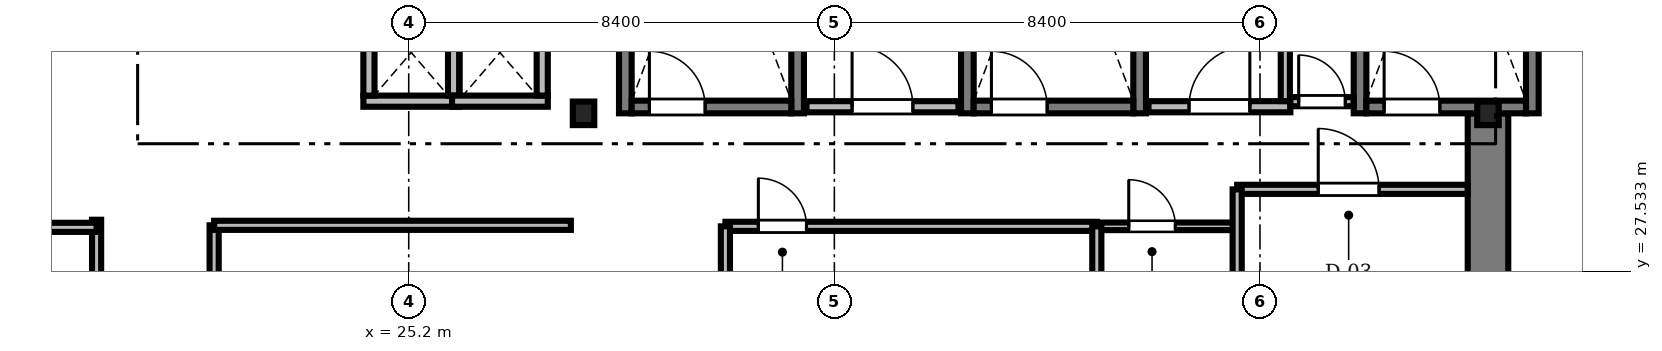
"""IFC4 building model, lengths in metres.
Left out: names, types, materials, properties, quantities, classifications, styles, units other than length and angle.
Written with IfcOpenShell. Run it as: python <this file> out.ifc"""

import sys

from ifc_helpers import new_model, si_unit, direction, frame, frame_2d, origin, origin_2d, place, context, subcontext, project, spatial, rectangle, i_section, extrude, source, transform, mapped, element, fill, save


model = new_model("IFC4")
c1 = context("Model", 3, precision=1e-05, world=origin(), true_north=direction((0.0, 1.0)))
c2 = subcontext(c1, "Body", "Model", "MODEL_VIEW")
j1 = project(units=[si_unit("LENGTHUNIT", "METRE"), si_unit("PLANEANGLEUNIT", "RADIAN")], contexts=[c1])
p1 = place(None, origin())
s1 = spatial("IfcSite", under=j1, at=p1, CompositionType="ELEMENT")
p2 = place(p1, origin())
s2 = spatial("IfcBuilding", under=s1, at=p2, CompositionType="ELEMENT")
p3 = place(p2, frame((0.0, 0.0, 118.7)))
s3 = spatial("IfcBuildingStorey", under=s2, at=p3, CompositionType="ELEMENT", Elevation=118.7)
m1 = source(origin(), c2, "Body", "SweptSolid", [
    extrude(rectangle(XDim=13.15, YDim=0.8, at=frame_2d((6.575, 0.0))), origin(), (0.0, 0.0, 1.0), 3.46),
])
p4 = place(p3, frame((46.5, 17.5, 0.0), z_axis=(0.0, 0.0, 1.0), x_axis=(0.0, 1.0, 0.0)))
e1 = element("IfcWall", 1, at=p4, inside=s3, PredefinedType="SHEAR", context=c2, shape_type="MappedRepresentation", body=[
    mapped(m1, transform((0.0, 0.0, 0.0), scale=1.0)),
])
m2 = source(origin(), c2, "Body", "SweptSolid", [
    extrude(i_section(OverallWidth=0.424, OverallDepth=0.465, WebThickness=0.035, FlangeThickness=0.056, FilletRadius=0.015, at=origin_2d()), origin(), (0.0, 0.0, 1.0), 3.46),
])
for number, where, z_axis, x_axis in (
    (2, (28.65, 30.65, 0.0), (0.0, 0.0, 1.0), (1.0, 0.0, 0.0)),
    (3, (46.5, 30.65, 0.0), (0.0, 0.0, 1.0), (1.0, 0.0, 0.0)),
):
    element("IfcColumn", number, at=place(p3, frame(where, z_axis=z_axis, x_axis=x_axis)), inside=s3, PredefinedType="COLUMN", context=c2, shape_type="MappedRepresentation", body=[
        mapped(m2, transform((0.0, 0.0, 0.0), scale=1.0)),
    ])
m3 = source(origin(), c2, "Body", "SweptSolid", [
    extrude(rectangle(XDim=9.25, YDim=0.25, at=frame_2d((4.625, 0.0))), origin(), (0.0, 0.0, 1.0), 3.5),
])
for number, where, z_axis, x_axis in (
    (4, (29.475, 30.65, 0.0), (0.0, 0.0, 1.0), (0.0, 1.0, 0.0)),
    (5, (32.875, 30.65, 0.0), (0.0, 0.0, 1.0), (0.0, 1.0, 0.0)),
):
    element("IfcWall", number, at=place(p3, frame(where, z_axis=z_axis, x_axis=x_axis)), inside=s3, PredefinedType="SOLIDWALL", context=c2, shape_type="MappedRepresentation", body=[
        mapped(m3, transform((0.0, 0.0, 0.0), scale=1.0)),
    ])
m4 = source(origin(), c2, "Body", "SweptSolid", [
    extrude(rectangle(XDim=3.15, YDim=0.25, at=frame_2d((1.575, 0.0))), origin(), (0.0, 0.0, 1.0), 3.5),
])
p5 = place(p3, frame((29.6, 30.775, 0.0), z_axis=(0.0, 0.0, 1.0), x_axis=(1.0, 0.0, 0.0)))
e6 = element("IfcWall", 6, at=p5, inside=s3, PredefinedType="SOLIDWALL", context=c2, shape_type="MappedRepresentation", body=[
    mapped(m4, transform((0.0, 0.0, 0.0), scale=1.0)),
])
m5 = source(origin(), c2, "Body", "SweptSolid", [
    extrude(rectangle(XDim=1.1, YDim=2.2, at=frame_2d((0.55, 1.1))), frame((0.0, 0.135, 0.0), z_axis=(0.0, -1.0, 0.0), x_axis=(1.0, 0.0, 0.0)), (0.0, 0.0, 1.0), 0.27),
])
p6 = place(p5, frame((0.35, 0.0, 0.0)))
e7 = element("IfcOpeningElement", 7, at=p6, cuts=e6, PredefinedType="OPENING", context=c2, shape_type="MappedRepresentation", body=[
    mapped(m5, transform((0.0, 0.0, 0.0), scale=1.0)),
])
for number, where, z_axis, x_axis in (
    (8, (36.225, 30.65, 0.0), (0.0, 0.0, 1.0), (0.0, 1.0, 0.0)),
    (9, (39.625, 30.65, 0.0), (0.0, 0.0, 1.0), (0.0, 1.0, 0.0)),
):
    element("IfcWall", number, at=place(p3, frame(where, z_axis=z_axis, x_axis=x_axis)), inside=s3, PredefinedType="SOLIDWALL", context=c2, shape_type="MappedRepresentation", body=[
        mapped(m3, transform((0.0, 0.0, 0.0), scale=1.0)),
    ])
p7 = place(p3, frame((36.35, 30.775, 0.0), z_axis=(0.0, 0.0, 1.0), x_axis=(1.0, 0.0, 0.0)))
e10 = element("IfcWall", 10, at=p7, inside=s3, PredefinedType="SOLIDWALL", context=c2, shape_type="MappedRepresentation", body=[
    mapped(m4, transform((0.0, 0.0, 0.0), scale=1.0)),
])
p8 = place(p7, frame((0.35, 0.0, 0.0)))
e11 = element("IfcOpeningElement", 11, at=p8, cuts=e10, PredefinedType="OPENING", context=c2, shape_type="MappedRepresentation", body=[
    mapped(m5, transform((0.0, 0.0, 0.0), scale=1.0)),
])
for number, where, z_axis, x_axis in (
    (12, (43.975, 30.65, 0.0), (0.0, 0.0, 1.0), (0.0, 1.0, 0.0)),
    (13, (47.375, 30.65, 0.0), (0.0, 0.0, 1.0), (0.0, 1.0, 0.0)),
):
    element("IfcWall", number, at=place(p3, frame(where, z_axis=z_axis, x_axis=x_axis)), inside=s3, PredefinedType="SOLIDWALL", context=c2, shape_type="MappedRepresentation", body=[
        mapped(m3, transform((0.0, 0.0, 0.0), scale=1.0)),
    ])
p9 = place(p3, frame((44.1, 30.775, 0.0), z_axis=(0.0, 0.0, 1.0), x_axis=(1.0, 0.0, 0.0)))
e14 = element("IfcWall", 14, at=p9, inside=s3, PredefinedType="SOLIDWALL", context=c2, shape_type="MappedRepresentation", body=[
    mapped(m4, transform((0.0, 0.0, 0.0), scale=1.0)),
])
p10 = place(p9, frame((0.35, 0.0, 0.0)))
e15 = element("IfcOpeningElement", 15, at=p10, cuts=e14, PredefinedType="OPENING", context=c2, shape_type="MappedRepresentation", body=[
    mapped(m5, transform((0.0, 0.0, 0.0), scale=1.0)),
])
m6 = source(origin(), c2, "Body", "SweptSolid", [
    extrude(rectangle(XDim=3.0, YDim=0.22, at=frame_2d((1.5, 0.0))), origin(), (0.0, 0.0, 1.0), 3.46),
])
p11 = place(p3, frame((33.05, 30.78, 0.0), z_axis=(0.0, 0.0, 1.0), x_axis=(1.0, 0.0, 0.0)))
e16 = element("IfcWall", 16, at=p11, inside=s3, PredefinedType="SOLIDWALL", context=c2, shape_type="MappedRepresentation", body=[
    mapped(m6, transform((0.0, 0.0, 0.0), scale=1.0)),
])
m7 = source(origin(), c2, "Body", "SweptSolid", [
    extrude(rectangle(XDim=1.2, YDim=2.2, at=frame_2d((0.6, 1.1))), frame((0.0, 0.12, 0.0), z_axis=(0.0, -1.0, 0.0), x_axis=(1.0, 0.0, 0.0)), (0.0, 0.0, 1.0), 0.24),
])
p12 = place(p11, frame((0.9, 0.0, 0.0)))
e17 = element("IfcOpeningElement", 17, at=p12, cuts=e16, PredefinedType="OPENING", context=c2, shape_type="MappedRepresentation", body=[
    mapped(m7, transform((0.0, 0.0, 0.0), scale=1.0)),
])
m8 = source(origin(), c2, "Body", "SweptSolid", [
    extrude(rectangle(XDim=2.8, YDim=0.22, at=frame_2d((1.4, 0.0))), origin(), (0.0, 0.0, 1.0), 3.46),
])
p13 = place(p3, frame((39.8, 30.78, 0.0), z_axis=(0.0, 0.0, 1.0), x_axis=(1.0, 0.0, 0.0)))
e18 = element("IfcWall", 18, at=p13, inside=s3, PredefinedType="SOLIDWALL", context=c2, shape_type="MappedRepresentation", body=[
    mapped(m8, transform((0.0, 0.0, 0.0), scale=1.0)),
])
p14 = place(p13, frame((0.8, 0.0, 0.0)))
e19 = element("IfcOpeningElement", 19, at=p14, cuts=e18, PredefinedType="OPENING", context=c2, shape_type="MappedRepresentation", body=[
    mapped(m7, transform((0.0, 0.0, 0.0), scale=1.0)),
])
m9 = source(origin(), c2, "Body", "SweptSolid", [
    extrude(rectangle(XDim=1.89, YDim=0.22, at=frame_2d((0.945, 0.0))), origin(), (0.0, 0.0, 1.0), 3.46),
])
p15 = place(p3, frame((24.305, 30.89, 0.0), z_axis=(0.0, 0.0, 1.0), x_axis=(1.0, 0.0, 0.0)))
e20 = element("IfcWall", 20, at=p15, inside=s3, PredefinedType="SOLIDWALL", context=c2, shape_type="MappedRepresentation", body=[
    mapped(m9, transform((0.0, 0.0, 0.0), scale=1.0)),
])
m10 = source(origin(), c2, "Body", "SweptSolid", [
    extrude(rectangle(XDim=1.7, YDim=0.22, at=frame_2d((0.85, 0.0))), origin(), (0.0, 0.0, 1.0), 3.46),
])
for number, where, z_axis, x_axis in (
    (21, (24.415, 31.0, 0.0), (0.0, 0.0, 1.0), (0.0, 1.0, 0.0)),
    (22, (26.085, 31.0, 0.0), (0.0, 0.0, 1.0), (0.0, 1.0, 0.0)),
):
    element("IfcWall", number, at=place(p3, frame(where, z_axis=z_axis, x_axis=x_axis)), inside=s3, PredefinedType="SOLIDWALL", context=c2, shape_type="MappedRepresentation", body=[
        mapped(m10, transform((0.0, 0.0, 0.0), scale=1.0)),
    ])
p16 = place(p3, frame((26.055, 30.89, 0.0), z_axis=(0.0, 0.0, 1.0), x_axis=(1.0, 0.0, 0.0)))
e23 = element("IfcWall", 23, at=p16, inside=s3, PredefinedType="SOLIDWALL", context=c2, shape_type="MappedRepresentation", body=[
    mapped(m9, transform((0.0, 0.0, 0.0), scale=1.0)),
])
p17 = place(p3, frame((27.835, 31.0, 0.0), z_axis=(0.0, 0.0, 1.0), x_axis=(0.0, 1.0, 0.0)))
e24 = element("IfcWall", 24, at=p17, inside=s3, PredefinedType="SOLIDWALL", context=c2, shape_type="MappedRepresentation", body=[
    mapped(m10, transform((0.0, 0.0, 0.0), scale=1.0)),
])
m11 = source(origin(), c2, "Body", "SweptSolid", [
    extrude(rectangle(XDim=14.6, YDim=0.18, at=frame_2d((7.3, 0.0))), origin(), (0.0, 0.0, 1.0), 2.852),
])
p18 = place(p3, frame((19.04, 13.95, 0.0), z_axis=(0.0, 0.0, 1.0), x_axis=(0.0, 1.0, 0.0)))
e25 = element("IfcWall", 25, at=p18, inside=s3, PredefinedType="PARTITIONING", context=c2, shape_type="MappedRepresentation", body=[
    mapped(m11, transform((0.0, 0.0, 0.0), scale=1.0)),
])
m12 = source(origin(), c2, "Body", "SweptSolid", [
    extrude(rectangle(XDim=1.05, YDim=2.2, at=frame_2d((0.525, 1.1))), frame((0.0, 0.1, 0.0), z_axis=(0.0, -1.0, 0.0), x_axis=(1.0, 0.0, 0.0)), (0.0, 0.0, 1.0), 0.2),
])
p19 = place(p18, frame((1.888, 0.0, 0.0)))
e26 = element("IfcOpeningElement", 26, at=p19, cuts=e25, PredefinedType="OPENING", context=c2, shape_type="MappedRepresentation", body=[
    mapped(m12, transform((0.0, 0.0, 0.0), scale=1.0)),
])
m13 = source(origin(), c2, "Body", "SweptSolid", [
    extrude(rectangle(XDim=0.95, YDim=2.15, at=frame_2d((0.475, 1.075))), frame((0.0, 0.1, 0.0), z_axis=(0.0, -1.0, 0.0), x_axis=(1.0, 0.0, 0.0)), (0.0, 0.0, 1.0), 0.2),
])
p20 = place(p18, frame((7.93, 0.0, 0.0)))
e27 = element("IfcOpeningElement", 27, at=p20, cuts=e25, PredefinedType="OPENING", context=c2, shape_type="MappedRepresentation", body=[
    mapped(m13, transform((0.0, 0.0, 0.0), scale=1.0)),
])
p21 = place(p18, frame((11.522, 0.0, 0.0)))
e28 = element("IfcOpeningElement", 28, at=p21, cuts=e25, PredefinedType="OPENING", context=c2, shape_type="MappedRepresentation", body=[
    mapped(m12, transform((0.0, 0.0, 0.0), scale=1.0)),
])
m14 = source(origin(), c2, "Body", "SweptSolid", [
    extrude(rectangle(XDim=11.94, YDim=0.18, at=frame_2d((5.97, 0.0))), origin(), (0.0, 0.0, 1.0), 2.852),
])
p22 = place(p3, frame((21.36, 16.5, 0.0), z_axis=(0.0, 0.0, 1.0), x_axis=(0.0, 1.0, 0.0)))
e29 = element("IfcWall", 29, at=p22, inside=s3, PredefinedType="PARTITIONING", context=c2, shape_type="MappedRepresentation", body=[
    mapped(m14, transform((0.0, 0.0, 0.0), scale=1.0)),
])
p23 = place(p22, frame((4.5, 0.0, 0.0)))
e30 = element("IfcOpeningElement", 30, at=p23, cuts=e29, PredefinedType="OPENING", context=c2, shape_type="MappedRepresentation", body=[
    mapped(m12, transform((0.0, 0.0, 0.0), scale=1.0)),
])
m15 = source(origin(), c2, "Body", "SweptSolid", [
    extrude(rectangle(XDim=7.33, YDim=0.18, at=frame_2d((3.665, 0.0))), origin(), (0.0, 0.0, 1.0), 3.092),
])
p24 = place(p3, frame((31.45, 28.42, 0.0), z_axis=(0.0, 0.0, 1.0), x_axis=(1.0, 0.0, 0.0)))
e31 = element("IfcWall", 31, at=p24, inside=s3, PredefinedType="PARTITIONING", context=c2, shape_type="MappedRepresentation", body=[
    mapped(m15, transform((0.0, 0.0, 0.0), scale=1.0)),
])
p25 = place(p24, frame((0.65, 0.0, 0.0)))
e32 = element("IfcOpeningElement", 32, at=p25, cuts=e31, PredefinedType="OPENING", context=c2, shape_type="MappedRepresentation", body=[
    mapped(m13, transform((0.0, 0.0, 0.0), scale=1.0)),
])
m16 = source(origin(), c2, "Body", "SweptSolid", [
    extrude(rectangle(XDim=4.548, YDim=0.18, at=frame_2d((2.274, 0.0))), origin(), (0.0, 0.0, 1.0), 3.092),
])
p26 = place(p3, frame((41.55, 29.15, 0.0), z_axis=(0.0, 0.0, 1.0), x_axis=(1.0, 0.0, 0.0)))
e33 = element("IfcWall", 33, at=p26, inside=s3, PredefinedType="PARTITIONING", context=c2, shape_type="MappedRepresentation", body=[
    mapped(m16, transform((0.0, 0.0, 0.0), scale=1.0)),
])
m17 = source(origin(), c2, "Body", "SweptSolid", [
    extrude(rectangle(XDim=1.2, YDim=2.2, at=frame_2d((0.6, 1.1))), frame((0.0, 0.1, 0.0), z_axis=(0.0, -1.0, 0.0), x_axis=(1.0, 0.0, 0.0)), (0.0, 0.0, 1.0), 0.2),
])
p27 = place(p26, frame((1.6, 0.0, 0.0)))
e34 = element("IfcOpeningElement", 34, at=p27, cuts=e33, PredefinedType="OPENING", context=c2, shape_type="MappedRepresentation", body=[
    mapped(m17, transform((0.0, 0.0, 0.0), scale=1.0)),
])
m18 = source(origin(), c2, "Body", "SweptSolid", [
    extrude(rectangle(XDim=2.74, YDim=0.15, at=frame_2d((1.37, 0.0))), origin(), (0.0, 0.0, 1.0), 3.46),
])
p28 = place(p3, frame((38.78, 28.42, 0.0), z_axis=(0.0, 0.0, 1.0), x_axis=(1.0, 0.0, 0.0)))
e35 = element("IfcWall", 35, at=p28, inside=s3, PredefinedType="PARTITIONING", context=c2, shape_type="MappedRepresentation", body=[
    mapped(m18, transform((0.0, 0.0, 0.0), scale=1.0)),
])
m19 = source(origin(), c2, "Body", "SweptSolid", [
    extrude(rectangle(XDim=0.92, YDim=2.1, at=frame_2d((0.46, 1.05))), frame((0.0, 0.085, 0.0), z_axis=(0.0, -1.0, 0.0), x_axis=(1.0, 0.0, 0.0)), (0.0, 0.0, 1.0), 0.17),
])
p29 = place(p28, frame((0.63, 0.0, 0.0)))
e36 = element("IfcOpeningElement", 36, at=p29, cuts=e35, PredefinedType="OPENING", context=c2, shape_type="MappedRepresentation", body=[
    mapped(m19, transform((0.0, 0.0, 0.0), scale=1.0)),
])
m20 = source(origin(), c2, "Body", "SweptSolid", [
    extrude(rectangle(XDim=1.248, YDim=0.18, at=frame_2d((0.624, 0.0))), origin(), (0.0, 0.0, 1.0), 3.46),
])
p30 = place(p3, frame((42.6, 30.88, 0.0), z_axis=(0.0, 0.0, 1.0), x_axis=(1.0, 0.0, 0.0)))
e37 = element("IfcWall", 37, at=p30, inside=s3, PredefinedType="PARTITIONING", context=c2, shape_type="MappedRepresentation", body=[
    mapped(m20, transform((0.0, 0.0, 0.0), scale=1.0)),
])
m21 = source(origin(), c2, "Body", "SweptSolid", [
    extrude(rectangle(XDim=0.92, YDim=2.1, at=frame_2d((0.46, 1.05))), frame((0.0, 0.1, 0.0), z_axis=(0.0, -1.0, 0.0), x_axis=(1.0, 0.0, 0.0)), (0.0, 0.0, 1.0), 0.2),
])
p31 = place(p30, frame((0.164, 0.0, 0.0)))
e38 = element("IfcOpeningElement", 38, at=p31, cuts=e37, PredefinedType="OPENING", context=c2, shape_type="MappedRepresentation", body=[
    mapped(m21, transform((0.0, 0.0, 0.0), scale=1.0)),
])
m22 = source(origin(), c2, "Body", "SweptSolid", [
    extrude(rectangle(XDim=12.31, YDim=0.18, at=frame_2d((6.155, 0.0))), origin(), (0.0, 0.0, 1.0), 2.702),
])
p32 = place(p3, frame((6.73, 28.4, 0.0), z_axis=(0.0, 0.0, 1.0), x_axis=(1.0, 0.0, 0.0)))
e39 = element("IfcWall", 39, at=p32, inside=s3, PredefinedType="PARTITIONING", context=c2, shape_type="MappedRepresentation", body=[
    mapped(m22, transform((0.0, 0.0, 0.0), scale=1.0)),
])
m23 = source(origin(), c2, "Body", "SweptSolid", [
    extrude(rectangle(XDim=7.04, YDim=0.18, at=frame_2d((3.52, 0.0))), origin(), (0.0, 0.0, 1.0), 3.46),
])
p33 = place(p3, frame((21.36, 28.44, 0.0), z_axis=(0.0, 0.0, 1.0), x_axis=(1.0, 0.0, 0.0)))
e40 = element("IfcWall", 40, at=p33, inside=s3, PredefinedType="PARTITIONING", context=c2, shape_type="MappedRepresentation", body=[
    mapped(m23, transform((0.0, 0.0, 0.0), scale=1.0)),
])
m24 = source(origin(), c2, "Body", "SweptSolid", [
    extrude(rectangle(XDim=2.758, YDim=0.18, at=frame_2d((1.379, 0.0))), origin(), (0.0, 0.0, 1.0), 3.46),
])
p34 = place(p3, frame((42.5, 30.892, 0.0), z_axis=(0.0, 0.0, 1.0), x_axis=(0.0, 1.0, 0.0)))
e41 = element("IfcWall", 41, at=p34, inside=s3, PredefinedType="PARTITIONING", context=c2, shape_type="MappedRepresentation", body=[
    mapped(m24, transform((0.0, 0.0, 0.0), scale=1.0)),
])
m25 = source(origin(), c2, "Body", "SweptSolid", [
    extrude(rectangle(XDim=2.35, YDim=0.18, at=frame_2d((1.175, 0.0))), origin(), (0.0, 0.0, 1.0), 2.852),
])
p35 = place(p3, frame((41.55, 26.8, 0.0), z_axis=(0.0, 0.0, 1.0), x_axis=(0.0, 1.0, 0.0)))
e42 = element("IfcWall", 42, at=p35, inside=s3, PredefinedType="PARTITIONING", context=c2, shape_type="MappedRepresentation", body=[
    mapped(m25, transform((0.0, 0.0, 0.0), scale=1.0)),
])
m26 = source(origin(), c2, "Body", "SweptSolid", [
    extrude(rectangle(XDim=1.6, YDim=0.18, at=frame_2d((0.8, 0.0))), origin(), (0.0, 0.0, 1.0), 3.002),
])
for number, where, z_axis, x_axis in (
    (43, (31.45, 26.82, 0.0), (0.0, 0.0, 1.0), (0.0, 1.0, 0.0)),
    (44, (38.78, 26.82, 0.0), (0.0, 0.0, 1.0), (0.0, 1.0, 0.0)),
):
    element("IfcWall", number, at=place(p3, frame(where, z_axis=z_axis, x_axis=x_axis)), inside=s3, PredefinedType="PARTITIONING", context=c2, shape_type="MappedRepresentation", body=[
        mapped(m26, transform((0.0, 0.0, 0.0), scale=1.0)),
    ])
m27 = source(origin(), c2, "Body", "SweptSolid", [
    extrude(rectangle(XDim=1.1, YDim=2.2, at=frame_2d((0.55, 1.1))), frame((0.0, 0.025, 0.0), z_axis=(0.0, -1.0, 0.0), x_axis=(1.0, 0.0, 0.0)), (0.0, 0.0, 1.0), 0.05),
])
p36 = place(p6, origin())
e45 = element("IfcDoor", 45, at=p36, inside=s3, OperationType="SINGLE_SWING_LEFT", PredefinedType="DOOR", context=c2, shape_type="MappedRepresentation", body=[
    mapped(m27, transform((0.0, 0.0, 0.0), scale=1.0)),
])
fill(e7, e45)
p37 = place(p8, origin())
e46 = element("IfcDoor", 46, at=p37, inside=s3, OperationType="SINGLE_SWING_LEFT", PredefinedType="DOOR", context=c2, shape_type="MappedRepresentation", body=[
    mapped(m27, transform((0.0, 0.0, 0.0), scale=1.0)),
])
fill(e11, e46)
p38 = place(p10, origin())
e47 = element("IfcDoor", 47, at=p38, inside=s3, OperationType="SINGLE_SWING_LEFT", PredefinedType="DOOR", context=c2, shape_type="MappedRepresentation", body=[
    mapped(m27, transform((0.0, 0.0, 0.0), scale=1.0)),
])
fill(e15, e47)
m28 = source(origin(), c2, "Body", "SweptSolid", [
    extrude(rectangle(XDim=1.2, YDim=2.2, at=frame_2d((0.6, 1.1))), frame((0.0, 0.025, 0.0), z_axis=(0.0, -1.0, 0.0), x_axis=(1.0, 0.0, 0.0)), (0.0, 0.0, 1.0), 0.05),
])
p39 = place(p12, origin())
e48 = element("IfcDoor", 48, at=p39, inside=s3, OperationType="SINGLE_SWING_LEFT", PredefinedType="DOOR", context=c2, shape_type="MappedRepresentation", body=[
    mapped(m28, transform((0.0, 0.0, 0.0), scale=1.0)),
])
fill(e17, e48)
p40 = place(p14, origin())
e49 = element("IfcDoor", 49, at=p40, inside=s3, OperationType="SINGLE_SWING_RIGHT", PredefinedType="DOOR", context=c2, shape_type="MappedRepresentation", body=[
    mapped(m28, transform((0.0, 0.0, 0.0), scale=1.0)),
])
fill(e19, e49)
m29 = source(origin(), c2, "Body", "SweptSolid", [
    extrude(rectangle(XDim=0.95, YDim=2.15, at=frame_2d((0.475, 1.075))), frame((0.0, 0.025, 0.0), z_axis=(0.0, -1.0, 0.0), x_axis=(1.0, 0.0, 0.0)), (0.0, 0.0, 1.0), 0.05),
])
p41 = place(p25, origin())
e50 = element("IfcDoor", 50, at=p41, inside=s3, OperationType="SINGLE_SWING_LEFT", PredefinedType="DOOR", context=c2, shape_type="MappedRepresentation", body=[
    mapped(m29, transform((0.0, 0.0, 0.0), scale=1.0)),
])
fill(e32, e50)
p42 = place(p27, origin())
e51 = element("IfcDoor", 51, at=p42, inside=s3, OperationType="SINGLE_SWING_LEFT", PredefinedType="DOOR", context=c2, shape_type="MappedRepresentation", body=[
    mapped(m28, transform((0.0, 0.0, 0.0), scale=1.0)),
])
fill(e34, e51)
m30 = source(origin(), c2, "Body", "SweptSolid", [
    extrude(rectangle(XDim=0.92, YDim=2.1, at=frame_2d((0.46, 1.05))), frame((0.0, 0.025, 0.0), z_axis=(0.0, -1.0, 0.0), x_axis=(1.0, 0.0, 0.0)), (0.0, 0.0, 1.0), 0.05),
])
p43 = place(p29, origin())
e52 = element("IfcDoor", 52, at=p43, inside=s3, OperationType="SINGLE_SWING_LEFT", PredefinedType="DOOR", context=c2, shape_type="MappedRepresentation", body=[
    mapped(m30, transform((0.0, 0.0, 0.0), scale=1.0)),
])
fill(e36, e52)
p44 = place(p31, origin())
e53 = element("IfcDoor", 53, at=p44, inside=s3, OperationType="SINGLE_SWING_LEFT", PredefinedType="DOOR", context=c2, shape_type="MappedRepresentation", body=[
    mapped(m30, transform((0.0, 0.0, 0.0), scale=1.0)),
])
fill(e38, e53)
save(model, sys.argv[1])
